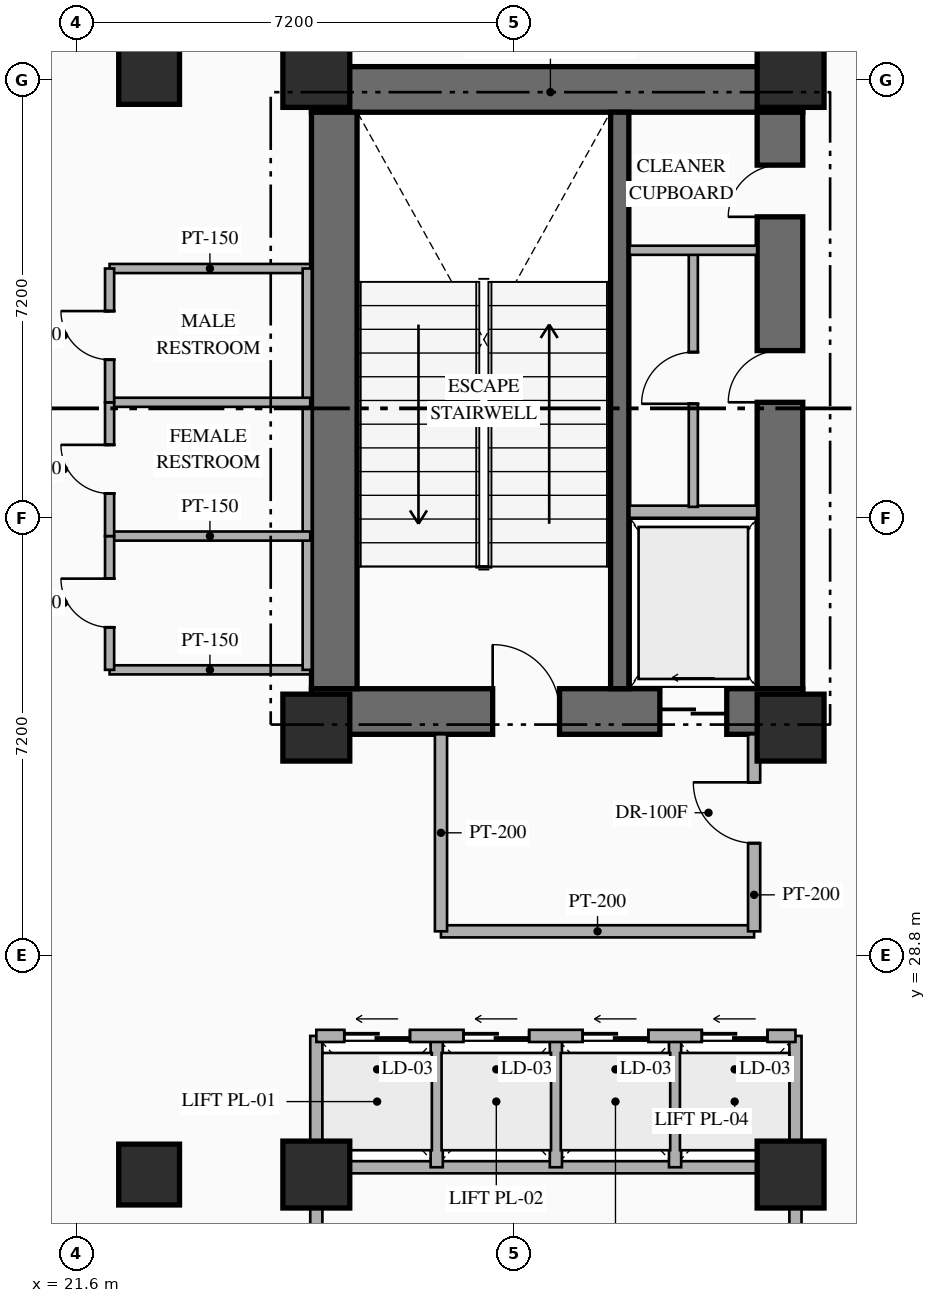
"""IFC4 building model, lengths in metres.
Left out: names, types, materials, properties, quantities, classifications, styles, units other than length and angle.
Written with IfcOpenShell. Run it as: python <this file> out.ifc"""

import sys

from ifc_helpers import new_model, si_unit, direction, frame, frame_2d, origin, origin_2d, place, context, subcontext, project, spatial, rectangle, hollow_rectangle, extrude, element, fill, save


model = new_model("IFC4")
c1 = context("Model", 3, precision=1e-05, world=origin(), true_north=direction((0.0, 1.0)))
c2 = subcontext(c1, "Body", "Model", "MODEL_VIEW")
j1 = project(units=[si_unit("LENGTHUNIT", "METRE"), si_unit("PLANEANGLEUNIT", "RADIAN")], contexts=[c1])
p1 = place(None, origin())
s1 = spatial("IfcSite", under=j1, at=p1, CompositionType="ELEMENT")
p2 = place(p1, origin())
s2 = spatial("IfcBuilding", under=s1, at=p2, CompositionType="ELEMENT")
p3 = place(p2, frame((0.0, 0.0, 32.1)))
s3 = spatial("IfcBuildingStorey", under=s2, at=p3, CompositionType="ELEMENT", Elevation=32.1)
p4 = place(p3, frame((25.47, 32.815, 0.0), z_axis=(0.0, 0.0, 1.0), x_axis=(1.0, 0.0, 0.0)))
e1 = element("IfcWall", 1, at=p4, inside=s3, PredefinedType="SHEAR", context=c2, shape_type="SweptSolid", body=[
    extrude(rectangle(XDim=8.08, YDim=0.75, at=frame_2d((4.04, 0.0))), origin(), (0.0, 0.0, 1.0), 4.5),
])
p5 = place(p4, frame((2.98, 0.0, 0.0)))
e2 = element("IfcOpeningElement", 2, at=p5, cuts=e1, PredefinedType="OPENING", context=c2, shape_type="SweptSolid", body=[
    extrude(rectangle(XDim=1.1, YDim=2.2, at=frame_2d((0.55, 1.1))), frame((0.0, 0.385, 0.0), z_axis=(0.0, -1.0, 0.0), x_axis=(1.0, 0.0, 0.0)), (0.0, 0.0, 1.0), 0.77),
])
p6 = place(p4, frame((5.73, 0.0, 0.0)))
e3 = element("IfcOpeningElement", 3, at=p6, cuts=e1, PredefinedType="OPENING", context=c2, shape_type="SweptSolid", body=[
    extrude(rectangle(XDim=1.1, YDim=2.15, at=frame_2d((0.55, 1.075))), frame((0.0, 0.385, 0.0), z_axis=(0.0, -1.0, 0.0), x_axis=(1.0, 0.0, 0.0)), (0.0, 0.0, 1.0), 0.77),
])
p7 = place(p3, frame((25.47, 43.045, 0.0), z_axis=(0.0, 0.0, 1.0), x_axis=(1.0, 0.0, 0.0)))
e4 = element("IfcWall", 4, at=p7, inside=s3, PredefinedType="SHEAR", context=c2, shape_type="SweptSolid", body=[
    extrude(rectangle(XDim=8.08, YDim=0.75, at=frame_2d((4.04, 0.0))), origin(), (0.0, 0.0, 1.0), 4.5),
])
p8 = place(p3, frame((25.845, 33.19, 0.0), z_axis=(0.0, 0.0, 1.0), x_axis=(0.0, 1.0, 0.0)))
e5 = element("IfcWall", 5, at=p8, inside=s3, PredefinedType="SHEAR", context=c2, shape_type="SweptSolid", body=[
    extrude(rectangle(XDim=9.48, YDim=0.75, at=frame_2d((4.74, 0.0))), origin(), (0.0, 0.0, 1.0), 4.5),
])
p9 = place(p3, frame((33.175, 33.19, 0.0), z_axis=(0.0, 0.0, 1.0), x_axis=(0.0, 1.0, 0.0)))
e6 = element("IfcWall", 6, at=p9, inside=s3, PredefinedType="SHEAR", context=c2, shape_type="SweptSolid", body=[
    extrude(rectangle(XDim=9.48, YDim=0.75, at=frame_2d((4.74, 0.0))), origin(), (0.0, 0.0, 1.0), 4.5),
])
p10 = place(p9, frame((4.71, 0.0, 0.0)))
e7 = element("IfcOpeningElement", 7, at=p10, cuts=e6, PredefinedType="OPENING", context=c2, shape_type="SweptSolid", body=[
    extrude(rectangle(XDim=0.85, YDim=2.08, at=frame_2d((0.425, 1.04))), frame((0.0, 0.385, 0.0), z_axis=(0.0, -1.0, 0.0), x_axis=(1.0, 0.0, 0.0)), (0.0, 0.0, 1.0), 0.77),
])
p11 = place(p9, frame((7.76, 0.0, 0.0)))
e8 = element("IfcOpeningElement", 8, at=p11, cuts=e6, PredefinedType="OPENING", context=c2, shape_type="SweptSolid", body=[
    extrude(rectangle(XDim=0.85, YDim=2.08, at=frame_2d((0.425, 1.04))), frame((0.0, 0.385, 0.0), z_axis=(0.0, -1.0, 0.0), x_axis=(1.0, 0.0, 0.0)), (0.0, 0.0, 1.0), 0.77),
])
p12 = place(p3, frame((30.54, 33.19, 0.0), z_axis=(0.0, 0.0, 1.0), x_axis=(0.0, 1.0, 0.0)))
e9 = element("IfcWall", 9, at=p12, inside=s3, PredefinedType="SHEAR", context=c2, shape_type="SweptSolid", body=[
    extrude(rectangle(XDim=9.48, YDim=0.3, at=frame_2d((4.74, 0.0))), origin(), (0.0, 0.0, 1.0), 4.5),
])
for number, where, z_axis, x_axis in (
    (10, (25.55, 32.55, 0.0), (0.0, 0.0, 1.0), (1.0, 0.0, 0.0)),
    (11, (33.35, 32.55, 0.0), (0.0, 0.0, 1.0), (1.0, 0.0, 0.0)),
    (12, (25.55, 43.3, 0.0), (0.0, 0.0, 1.0), (1.0, 0.0, 0.0)),
    (13, (33.35, 43.3, 0.0), (0.0, 0.0, 1.0), (1.0, 0.0, 0.0)),
):
    element("IfcColumn", number, at=place(p3, frame(where, z_axis=z_axis, x_axis=x_axis)), inside=s3, PredefinedType="COLUMN", context=c2, shape_type="SweptSolid", body=[
        extrude(rectangle(XDim=1.1, YDim=1.1, at=origin_2d()), origin(), (0.0, 0.0, 1.0), 4.5),
    ])
for number, where, z_axis, x_axis in (
    (14, (25.55, 25.2, 0.0), (0.0, 0.0, 1.0), (1.0, 0.0, 0.0)),
    (15, (33.35, 25.2, 0.0), (0.0, 0.0, 1.0), (1.0, 0.0, 0.0)),
):
    element("IfcColumn", number, at=place(p3, frame(where, z_axis=z_axis, x_axis=x_axis)), inside=s3, PredefinedType="COLUMN", context=c2, shape_type="SweptSolid", body=[
        extrude(hollow_rectangle(XDim=1.1, YDim=1.1, WallThickness=0.04, at=origin_2d()), origin(), (0.0, 0.0, 1.0), 4.5),
    ])
for number, where, z_axis, x_axis in (
    (16, (22.8, 25.2, 0.0), (0.0, 0.0, 1.0), (1.0, 0.0, 0.0)),
    (17, (22.8, 43.3, 0.0), (0.0, 0.0, 1.0), (1.0, 0.0, 0.0)),
):
    element("IfcColumn", number, at=place(p3, frame(where, z_axis=z_axis, x_axis=x_axis)), inside=s3, PredefinedType="COLUMN", context=c2, shape_type="SweptSolid", body=[
        extrude(hollow_rectangle(XDim=1.0, YDim=1.0, WallThickness=0.038, at=origin_2d()), origin(), (0.0, 0.0, 1.0), 4.5),
    ])
p13 = place(p3, frame((30.7, 36.1, 0.0), z_axis=(0.0, 0.0, 1.0), x_axis=(1.0, 0.0, 0.0)))
e18 = element("IfcWall", 18, at=p13, inside=s3, PredefinedType="STANDARD", context=c2, shape_type="SweptSolid", body=[
    extrude(rectangle(XDim=2.1, YDim=0.2, at=frame_2d((1.05, 0.0))), origin(), (0.0, 0.0, 1.0), 4.28),
])
p14 = place(p3, frame((31.75, 36.18, 0.0), z_axis=(0.0, 0.0, 1.0), x_axis=(0.0, 1.0, 0.0)))
e19 = element("IfcWall", 19, at=p14, inside=s3, PredefinedType="PARTITIONING", context=c2, shape_type="SweptSolid", body=[
    extrude(rectangle(XDim=4.24, YDim=0.15, at=frame_2d((2.12, 0.0))), origin(), (0.0, 0.0, 1.0), 4.28),
])
p15 = place(p14, frame((1.695, 0.0, 0.0)))
e20 = element("IfcOpeningElement", 20, at=p15, cuts=e19, PredefinedType="OPENING", context=c2, shape_type="SweptSolid", body=[
    extrude(rectangle(XDim=0.85, YDim=2.08, at=frame_2d((0.425, 1.04))), frame((0.0, 0.085, 0.0), z_axis=(0.0, -1.0, 0.0), x_axis=(1.0, 0.0, 0.0)), (0.0, 0.0, 1.0), 0.17),
])
p16 = place(p3, frame((30.7, 40.4, 0.0), z_axis=(0.0, 0.0, 1.0), x_axis=(1.0, 0.0, 0.0)))
e21 = element("IfcWall", 21, at=p16, inside=s3, PredefinedType="PARTITIONING", context=c2, shape_type="SweptSolid", body=[
    extrude(rectangle(XDim=2.1, YDim=0.15, at=frame_2d((1.05, 0.0))), origin(), (0.0, 0.0, 1.0), 4.28),
])
p17 = place(p3, frame((27.6, 29.2, 0.0), z_axis=(0.0, 0.0, 1.0), x_axis=(1.0, 0.0, 0.0)))
e22 = element("IfcWall", 22, at=p17, inside=s3, PredefinedType="STANDARD", context=c2, shape_type="SweptSolid", body=[
    extrude(rectangle(XDim=5.15, YDim=0.2, at=frame_2d((2.575, 0.0))), origin(), (0.0, 0.0, 1.0), 4.28),
])
p18 = place(p3, frame((27.6, 29.2, 0.0), z_axis=(0.0, 0.0, 1.0), x_axis=(0.0, 1.0, 0.0)))
e23 = element("IfcWall", 23, at=p18, inside=s3, PredefinedType="STANDARD", context=c2, shape_type="SweptSolid", body=[
    extrude(rectangle(XDim=3.24, YDim=0.2, at=frame_2d((1.62, 0.0))), origin(), (0.0, 0.0, 1.0), 4.28),
])
p19 = place(p3, frame((32.75, 29.2, 0.0), z_axis=(0.0, 0.0, 1.0), x_axis=(0.0, 1.0, 0.0)))
e24 = element("IfcWall", 24, at=p19, inside=s3, PredefinedType="STANDARD", context=c2, shape_type="SweptSolid", body=[
    extrude(rectangle(XDim=3.24, YDim=0.2, at=frame_2d((1.62, 0.0))), origin(), (0.0, 0.0, 1.0), 4.28),
])
p20 = place(p19, frame((1.45, 0.0, 0.0)))
e25 = element("IfcOpeningElement", 25, at=p20, cuts=e24, PredefinedType="OPENING", context=c2, shape_type="SweptSolid", body=[
    extrude(rectangle(XDim=1.0, YDim=2.2, at=frame_2d((0.5, 1.1))), frame((0.0, 0.11, 0.0), z_axis=(0.0, -1.0, 0.0), x_axis=(1.0, 0.0, 0.0)), (0.0, 0.0, 1.0), 0.22),
])
for number, where, z_axis, x_axis in (
    (26, (25.55, 23.4, 0.0), (0.0, 0.0, 1.0), (0.0, 1.0, 0.0)),
    (27, (33.43, 23.4, 0.0), (0.0, 0.0, 1.0), (0.0, 1.0, 0.0)),
):
    element("IfcWall", number, at=place(p3, frame(where, z_axis=z_axis, x_axis=x_axis)), inside=s3, PredefinedType="STANDARD", context=c2, shape_type="SweptSolid", body=[
        extrude(rectangle(XDim=4.08, YDim=0.2, at=frame_2d((2.04, 0.0))), origin(), (0.0, 0.0, 1.0), 3.475),
    ])
p21 = place(p3, frame((25.55, 25.32, 0.0), z_axis=(0.0, 0.0, 1.0), x_axis=(1.0, 0.0, 0.0)))
e28 = element("IfcWall", 28, at=p21, inside=s3, PredefinedType="STANDARD", context=c2, shape_type="SweptSolid", body=[
    extrude(rectangle(XDim=7.88, YDim=0.2, at=frame_2d((3.94, 0.0))), origin(), (0.0, 0.0, 1.0), 3.675),
])
for number, where, z_axis, x_axis in (
    (29, (27.53, 25.32, 0.0), (0.0, 0.0, 1.0), (0.0, 1.0, 0.0)),
    (30, (29.49, 25.32, 0.0), (0.0, 0.0, 1.0), (0.0, 1.0, 0.0)),
    (31, (31.45, 25.32, 0.0), (0.0, 0.0, 1.0), (0.0, 1.0, 0.0)),
):
    element("IfcWall", number, at=place(p3, frame(where, z_axis=z_axis, x_axis=x_axis)), inside=s3, PredefinedType="STANDARD", context=c2, shape_type="SweptSolid", body=[
        extrude(rectangle(XDim=2.16, YDim=0.2, at=frame_2d((1.08, 0.0))), origin(), (0.0, 0.0, 1.0), 4.28),
    ])
p22 = place(p3, frame((25.55, 27.48, 0.0), z_axis=(0.0, 0.0, 1.0), x_axis=(1.0, 0.0, 0.0)))
e32 = element("IfcWall", 32, at=p22, inside=s3, PredefinedType="STANDARD", context=c2, shape_type="SweptSolid", body=[
    extrude(rectangle(XDim=7.88, YDim=0.2, at=frame_2d((3.94, 0.0))), origin(), (0.0, 0.0, 1.0), 4.28),
])
p23 = place(p22, frame((0.46, 0.0, 0.0)))
e33 = element("IfcOpeningElement", 33, at=p23, cuts=e32, PredefinedType="OPENING", context=c2, shape_type="SweptSolid", body=[
    extrude(rectangle(XDim=1.08, YDim=2.15, at=frame_2d((0.54, 1.075))), frame((0.0, 0.11, 0.0), z_axis=(0.0, -1.0, 0.0), x_axis=(1.0, 0.0, 0.0)), (0.0, 0.0, 1.0), 0.22),
])
p24 = place(p22, frame((2.42, 0.0, 0.0)))
e34 = element("IfcOpeningElement", 34, at=p24, cuts=e32, PredefinedType="OPENING", context=c2, shape_type="SweptSolid", body=[
    extrude(rectangle(XDim=1.08, YDim=2.15, at=frame_2d((0.54, 1.075))), frame((0.0, 0.11, 0.0), z_axis=(0.0, -1.0, 0.0), x_axis=(1.0, 0.0, 0.0)), (0.0, 0.0, 1.0), 0.22),
])
p25 = place(p22, frame((4.38, 0.0, 0.0)))
e35 = element("IfcOpeningElement", 35, at=p25, cuts=e32, PredefinedType="OPENING", context=c2, shape_type="SweptSolid", body=[
    extrude(rectangle(XDim=1.08, YDim=2.15, at=frame_2d((0.54, 1.075))), frame((0.0, 0.11, 0.0), z_axis=(0.0, -1.0, 0.0), x_axis=(1.0, 0.0, 0.0)), (0.0, 0.0, 1.0), 0.22),
])
p26 = place(p22, frame((6.34, 0.0, 0.0)))
e36 = element("IfcOpeningElement", 36, at=p26, cuts=e32, PredefinedType="OPENING", context=c2, shape_type="SweptSolid", body=[
    extrude(rectangle(XDim=1.08, YDim=2.15, at=frame_2d((0.54, 1.075))), frame((0.0, 0.11, 0.0), z_axis=(0.0, -1.0, 0.0), x_axis=(1.0, 0.0, 0.0)), (0.0, 0.0, 1.0), 0.22),
])
for number, where, z_axis, x_axis in (
    (37, (22.15, 33.5, 0.0), (0.0, 0.0, 1.0), (1.0, 0.0, 0.0)),
    (38, (22.15, 40.1, 0.0), (0.0, 0.0, 1.0), (1.0, 0.0, 0.0)),
):
    element("IfcWall", number, at=place(p3, frame(where, z_axis=z_axis, x_axis=x_axis)), inside=s3, PredefinedType="PARTITIONING", context=c2, shape_type="SweptSolid", body=[
        extrude(rectangle(XDim=3.3, YDim=0.15, at=frame_2d((1.65, 0.0))), origin(), (0.0, 0.0, 1.0), 4.28),
    ])
p27 = place(p3, frame((25.4, 33.5, 0.0), z_axis=(0.0, 0.0, 1.0), x_axis=(0.0, 1.0, 0.0)))
e39 = element("IfcWall", 39, at=p27, inside=s3, PredefinedType="PARTITIONING", context=c2, shape_type="SweptSolid", body=[
    extrude(rectangle(XDim=6.6, YDim=0.15, at=frame_2d((3.3, 0.0))), origin(), (0.0, 0.0, 1.0), 4.28),
])
for number, where, z_axis, x_axis in (
    (40, (22.15, 35.7, 0.0), (0.0, 0.0, 1.0), (1.0, 0.0, 0.0)),
    (41, (22.15, 37.9, 0.0), (0.0, 0.0, 1.0), (1.0, 0.0, 0.0)),
):
    element("IfcWall", number, at=place(p3, frame(where, z_axis=z_axis, x_axis=x_axis)), inside=s3, PredefinedType="PARTITIONING", context=c2, shape_type="SweptSolid", body=[
        extrude(rectangle(XDim=3.3, YDim=0.15, at=frame_2d((1.65, 0.0))), origin(), (0.0, 0.0, 1.0), 4.28),
    ])
p28 = place(p3, frame((22.15, 33.5, 0.0), z_axis=(0.0, 0.0, 1.0), x_axis=(0.0, 1.0, 0.0)))
e42 = element("IfcWall", 42, at=p28, inside=s3, PredefinedType="PARTITIONING", context=c2, shape_type="SweptSolid", body=[
    extrude(rectangle(XDim=2.2, YDim=0.15, at=frame_2d((1.1, 0.0))), origin(), (0.0, 0.0, 1.0), 4.28),
])
p29 = place(p28, frame((0.7, 0.0, 0.0)))
e43 = element("IfcOpeningElement", 43, at=p29, cuts=e42, PredefinedType="OPENING", context=c2, shape_type="SweptSolid", body=[
    extrude(rectangle(XDim=0.8, YDim=2.06, at=frame_2d((0.4, 1.03))), frame((0.0, 0.085, 0.0), z_axis=(0.0, -1.0, 0.0), x_axis=(1.0, 0.0, 0.0)), (0.0, 0.0, 1.0), 0.17),
])
p30 = place(p3, frame((22.15, 35.7, 0.0), z_axis=(0.0, 0.0, 1.0), x_axis=(0.0, 1.0, 0.0)))
e44 = element("IfcWall", 44, at=p30, inside=s3, PredefinedType="PARTITIONING", context=c2, shape_type="SweptSolid", body=[
    extrude(rectangle(XDim=2.2, YDim=0.15, at=frame_2d((1.1, 0.0))), origin(), (0.0, 0.0, 1.0), 4.28),
])
p31 = place(p30, frame((0.7, 0.0, 0.0)))
e45 = element("IfcOpeningElement", 45, at=p31, cuts=e44, PredefinedType="OPENING", context=c2, shape_type="SweptSolid", body=[
    extrude(rectangle(XDim=0.8, YDim=2.06, at=frame_2d((0.4, 1.03))), frame((0.0, 0.085, 0.0), z_axis=(0.0, -1.0, 0.0), x_axis=(1.0, 0.0, 0.0)), (0.0, 0.0, 1.0), 0.17),
])
p32 = place(p3, frame((22.15, 37.9, 0.0), z_axis=(0.0, 0.0, 1.0), x_axis=(0.0, 1.0, 0.0)))
e46 = element("IfcWall", 46, at=p32, inside=s3, PredefinedType="PARTITIONING", context=c2, shape_type="SweptSolid", body=[
    extrude(rectangle(XDim=2.2, YDim=0.15, at=frame_2d((1.1, 0.0))), origin(), (0.0, 0.0, 1.0), 4.28),
])
p33 = place(p32, frame((0.7, 0.0, 0.0)))
e47 = element("IfcOpeningElement", 47, at=p33, cuts=e46, PredefinedType="OPENING", context=c2, shape_type="SweptSolid", body=[
    extrude(rectangle(XDim=0.8, YDim=2.06, at=frame_2d((0.4, 1.03))), frame((0.0, 0.085, 0.0), z_axis=(0.0, -1.0, 0.0), x_axis=(1.0, 0.0, 0.0)), (0.0, 0.0, 1.0), 0.17),
])
p34 = place(p5, origin())
e48 = element("IfcDoor", 48, at=p34, inside=s3, OperationType="SINGLE_SWING_LEFT", PredefinedType="DOOR", context=c2, shape_type="SweptSolid", body=[
    extrude(rectangle(XDim=1.1, YDim=2.2, at=frame_2d((0.55, 1.1))), frame((0.0, 0.025, 0.0), z_axis=(0.0, -1.0, 0.0), x_axis=(1.0, 0.0, 0.0)), (0.0, 0.0, 1.0), 0.05),
])
fill(e2, e48)
p35 = place(p6, origin())
e49 = element("IfcDoor", 49, at=p35, inside=s3, OperationType="SLIDING_TO_LEFT", PredefinedType="USERDEFINED", context=c2, shape_type="SweptSolid", body=[
    extrude(rectangle(XDim=1.1, YDim=2.15, at=frame_2d((0.55, 1.075))), frame((0.0, 0.025, 0.0), z_axis=(0.0, -1.0, 0.0), x_axis=(1.0, 0.0, 0.0)), (0.0, 0.0, 1.0), 0.05),
])
fill(e3, e49)
p36 = place(p10, origin())
e50 = element("IfcDoor", 50, at=p36, inside=s3, OperationType="SINGLE_SWING_LEFT", PredefinedType="DOOR", context=c2, shape_type="SweptSolid", body=[
    extrude(rectangle(XDim=0.85, YDim=2.08, at=frame_2d((0.425, 1.04))), frame((0.0, 0.025, 0.0), z_axis=(0.0, -1.0, 0.0), x_axis=(1.0, 0.0, 0.0)), (0.0, 0.0, 1.0), 0.05),
])
fill(e7, e50)
p37 = place(p11, origin())
e51 = element("IfcDoor", 51, at=p37, inside=s3, OperationType="SINGLE_SWING_LEFT", PredefinedType="DOOR", context=c2, shape_type="SweptSolid", body=[
    extrude(rectangle(XDim=0.85, YDim=2.08, at=frame_2d((0.425, 1.04))), frame((0.0, 0.025, 0.0), z_axis=(0.0, -1.0, 0.0), x_axis=(1.0, 0.0, 0.0)), (0.0, 0.0, 1.0), 0.05),
])
fill(e8, e51)
p38 = place(p15, origin())
e52 = element("IfcDoor", 52, at=p38, inside=s3, OperationType="SINGLE_SWING_LEFT", PredefinedType="DOOR", context=c2, shape_type="SweptSolid", body=[
    extrude(rectangle(XDim=0.85, YDim=2.08, at=frame_2d((0.425, 1.04))), frame((0.0, 0.025, 0.0), z_axis=(0.0, -1.0, 0.0), x_axis=(1.0, 0.0, 0.0)), (0.0, 0.0, 1.0), 0.05),
])
fill(e20, e52)
p39 = place(p20, origin())
e53 = element("IfcDoor", 53, at=p39, inside=s3, OperationType="SINGLE_SWING_RIGHT", PredefinedType="DOOR", context=c2, shape_type="SweptSolid", body=[
    extrude(rectangle(XDim=1.0, YDim=2.2, at=frame_2d((0.5, 1.1))), frame((0.0, 0.025, 0.0), z_axis=(0.0, -1.0, 0.0), x_axis=(1.0, 0.0, 0.0)), (0.0, 0.0, 1.0), 0.05),
])
fill(e25, e53)
p40 = place(p23, origin())
e54 = element("IfcDoor", 54, at=p40, inside=s3, OperationType="SLIDING_TO_LEFT", PredefinedType="USERDEFINED", context=c2, shape_type="SweptSolid", body=[
    extrude(rectangle(XDim=1.08, YDim=2.15, at=frame_2d((0.54, 1.075))), frame((0.0, 0.025, 0.0), z_axis=(0.0, -1.0, 0.0), x_axis=(1.0, 0.0, 0.0)), (0.0, 0.0, 1.0), 0.05),
])
fill(e33, e54)
p41 = place(p24, origin())
e55 = element("IfcDoor", 55, at=p41, inside=s3, OperationType="SLIDING_TO_LEFT", PredefinedType="USERDEFINED", context=c2, shape_type="SweptSolid", body=[
    extrude(rectangle(XDim=1.08, YDim=2.15, at=frame_2d((0.54, 1.075))), frame((0.0, 0.025, 0.0), z_axis=(0.0, -1.0, 0.0), x_axis=(1.0, 0.0, 0.0)), (0.0, 0.0, 1.0), 0.05),
])
fill(e34, e55)
p42 = place(p25, origin())
e56 = element("IfcDoor", 56, at=p42, inside=s3, OperationType="SLIDING_TO_LEFT", PredefinedType="USERDEFINED", context=c2, shape_type="SweptSolid", body=[
    extrude(rectangle(XDim=1.08, YDim=2.15, at=frame_2d((0.54, 1.075))), frame((0.0, 0.025, 0.0), z_axis=(0.0, -1.0, 0.0), x_axis=(1.0, 0.0, 0.0)), (0.0, 0.0, 1.0), 0.05),
])
fill(e35, e56)
p43 = place(p26, origin())
e57 = element("IfcDoor", 57, at=p43, inside=s3, OperationType="SLIDING_TO_LEFT", PredefinedType="USERDEFINED", context=c2, shape_type="SweptSolid", body=[
    extrude(rectangle(XDim=1.08, YDim=2.15, at=frame_2d((0.54, 1.075))), frame((0.0, 0.025, 0.0), z_axis=(0.0, -1.0, 0.0), x_axis=(1.0, 0.0, 0.0)), (0.0, 0.0, 1.0), 0.05),
])
fill(e36, e57)
p44 = place(p29, origin())
e58 = element("IfcDoor", 58, at=p44, inside=s3, OperationType="SINGLE_SWING_RIGHT", PredefinedType="DOOR", context=c2, shape_type="SweptSolid", body=[
    extrude(rectangle(XDim=0.8, YDim=2.06, at=frame_2d((0.4, 1.03))), frame((0.0, 0.025, 0.0), z_axis=(0.0, -1.0, 0.0), x_axis=(1.0, 0.0, 0.0)), (0.0, 0.0, 1.0), 0.05),
])
fill(e43, e58)
p45 = place(p31, origin())
e59 = element("IfcDoor", 59, at=p45, inside=s3, OperationType="SINGLE_SWING_RIGHT", PredefinedType="DOOR", context=c2, shape_type="SweptSolid", body=[
    extrude(rectangle(XDim=0.8, YDim=2.06, at=frame_2d((0.4, 1.03))), frame((0.0, 0.025, 0.0), z_axis=(0.0, -1.0, 0.0), x_axis=(1.0, 0.0, 0.0)), (0.0, 0.0, 1.0), 0.05),
])
fill(e45, e59)
p46 = place(p33, origin())
e60 = element("IfcDoor", 60, at=p46, inside=s3, OperationType="SINGLE_SWING_RIGHT", PredefinedType="DOOR", context=c2, shape_type="SweptSolid", body=[
    extrude(rectangle(XDim=0.8, YDim=2.06, at=frame_2d((0.4, 1.03))), frame((0.0, 0.025, 0.0), z_axis=(0.0, -1.0, 0.0), x_axis=(1.0, 0.0, 0.0)), (0.0, 0.0, 1.0), 0.05),
])
fill(e47, e60)
save(model, sys.argv[1])
